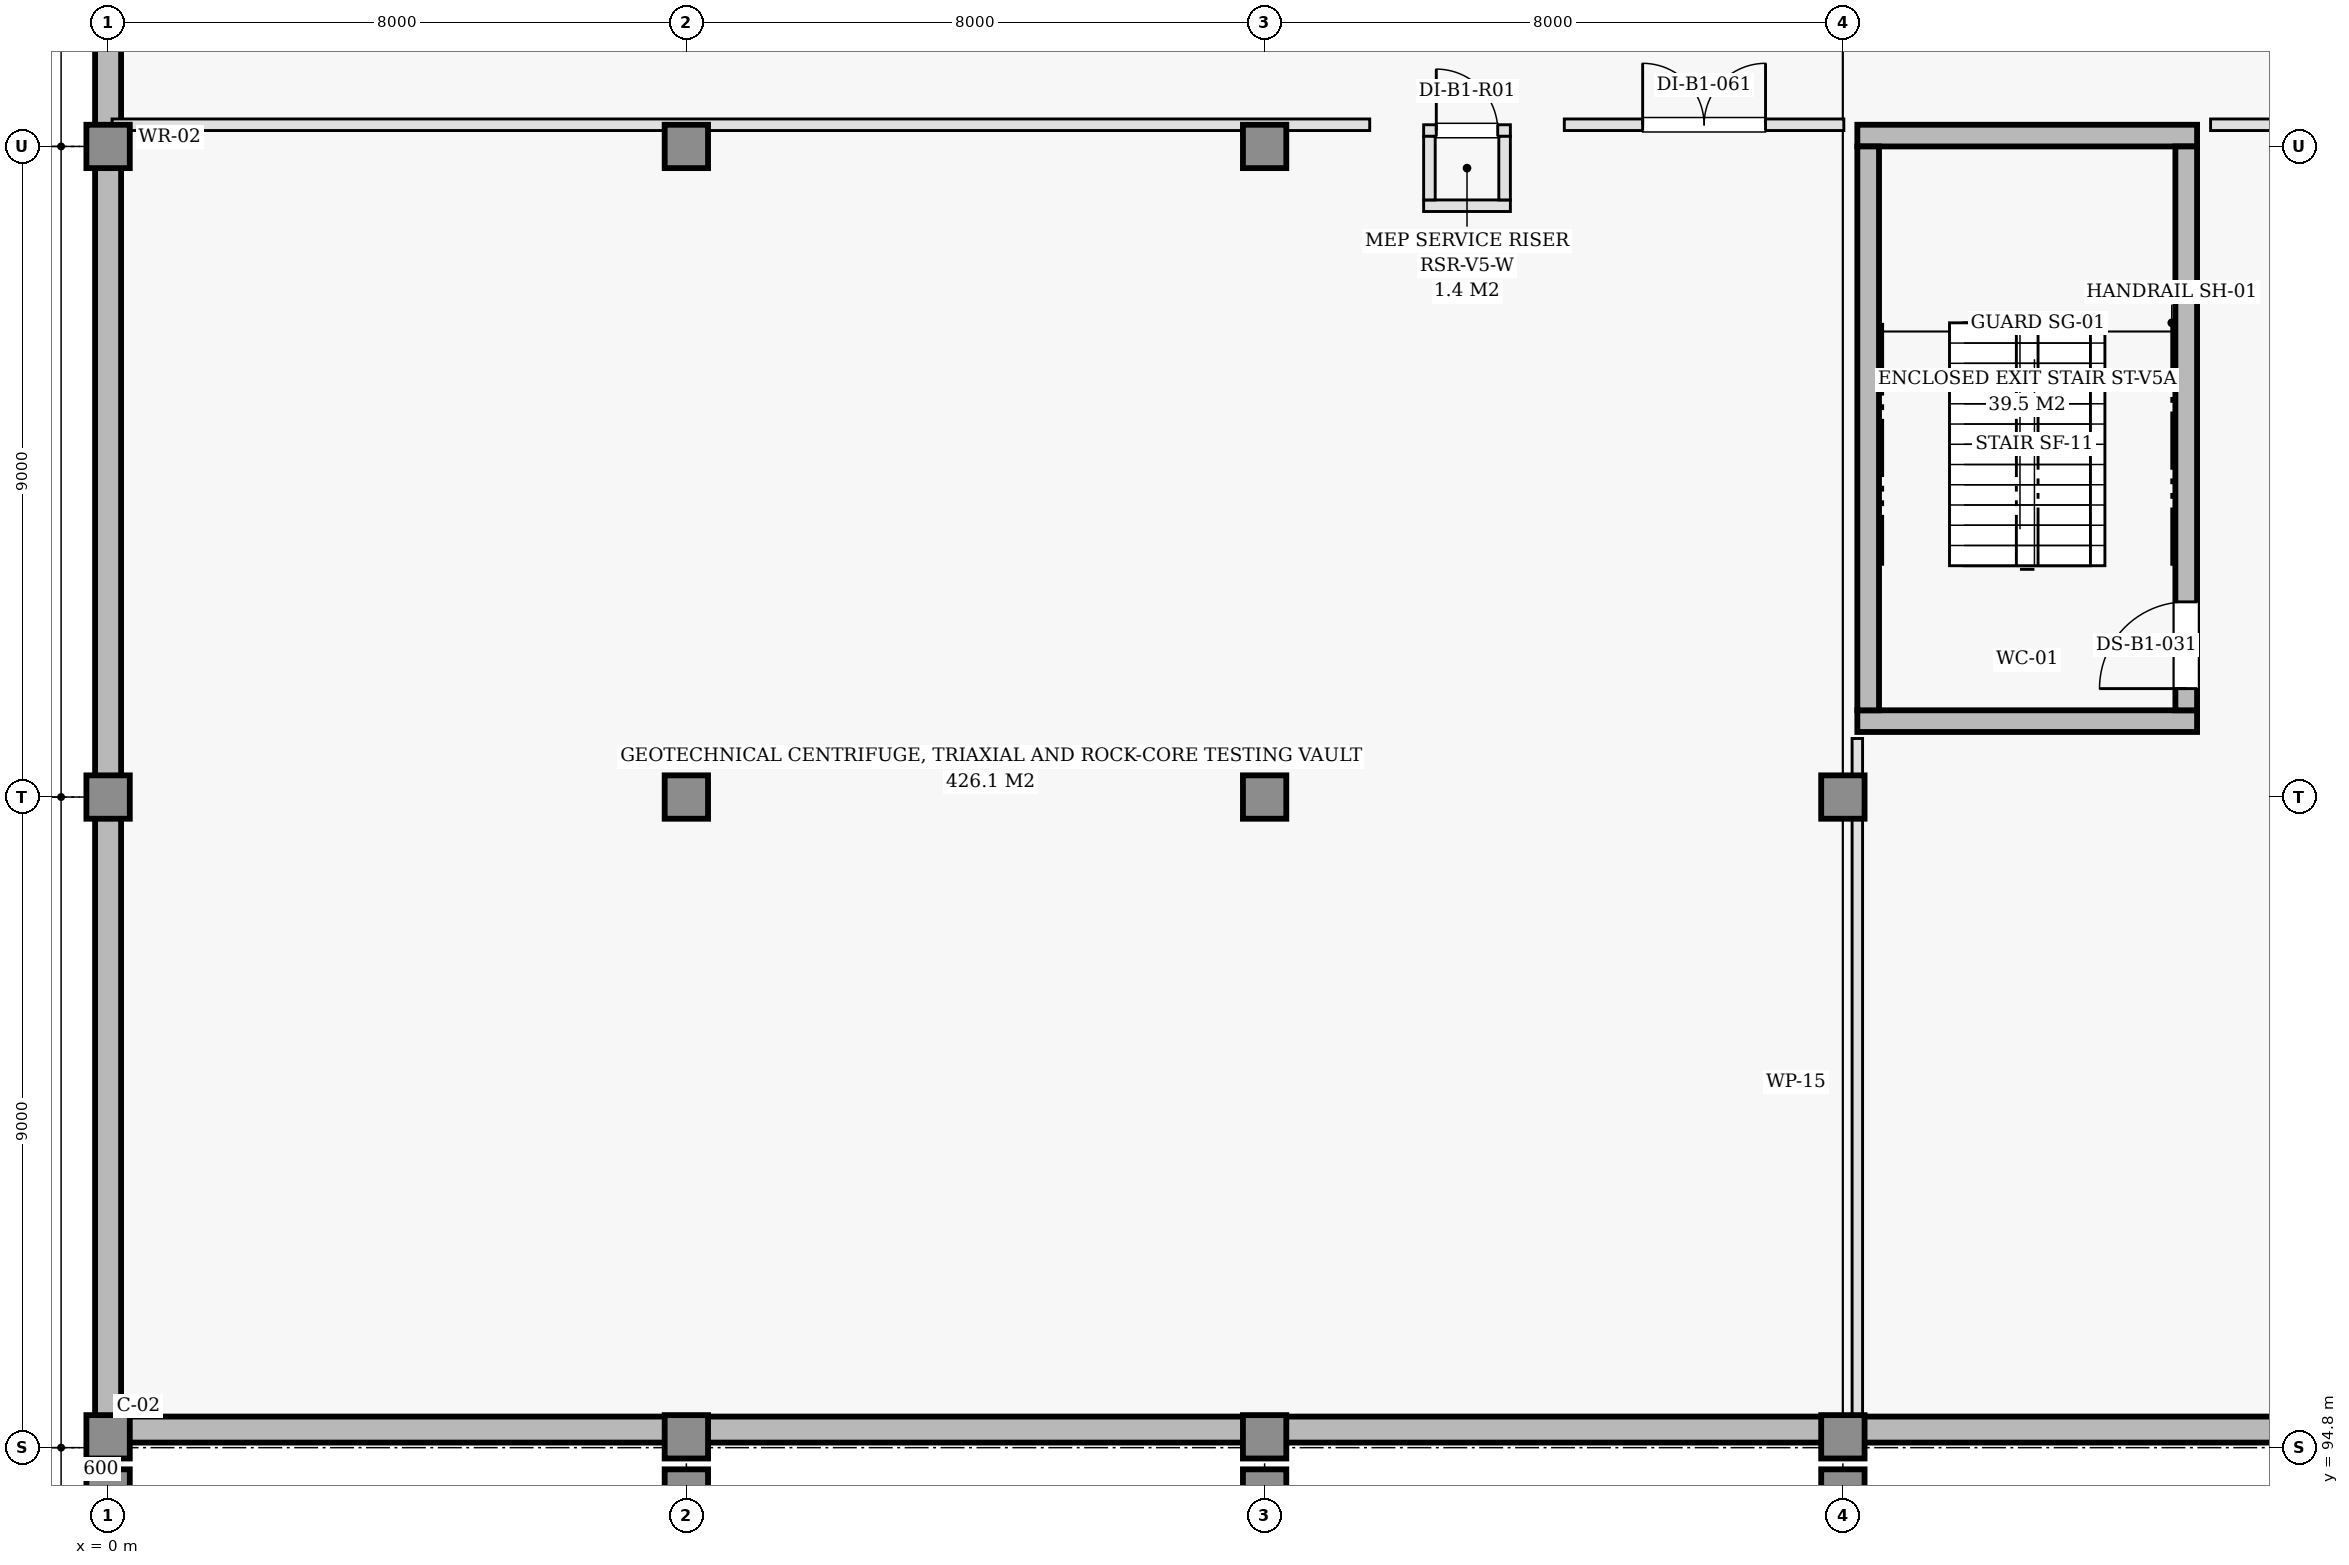
"""IFC4 building model, lengths in metres.
Left out: names, types, materials, properties, quantities, classifications, styles, units other than length and angle.
Written with IfcOpenShell. Run it as: python <this file> out.ifc"""

import sys

from ifc_helpers import new_model, si_unit, direction, frame, frame_2d, origin, origin_2d, place, context, subcontext, project, spatial, rectangle, extrude, element, fill, save


model = new_model("IFC4")
c1 = context("Model", 3, precision=1e-05, world=origin(), true_north=direction((0.0, 1.0)))
c2 = subcontext(c1, "Body", "Model", "MODEL_VIEW")
j1 = project(units=[si_unit("LENGTHUNIT", "METRE"), si_unit("PLANEANGLEUNIT", "RADIAN")], contexts=[c1])
p1 = place(None, origin())
s1 = spatial("IfcSite", under=j1, at=p1, CompositionType="ELEMENT")
p2 = place(p1, origin())
s2 = spatial("IfcBuilding", under=s1, at=p2, CompositionType="ELEMENT")
p3 = place(p2, frame((0.0, 0.0, -4.5)))
s3 = spatial("IfcBuildingStorey", under=s2, at=p3, CompositionType="ELEMENT", Elevation=-4.5)
for number, where, z_axis, x_axis in (
    (1, (0.0, 94.95, 0.0), (0.0, 0.0, 1.0), (1.0, 0.0, 0.0)),
    (2, (0.0, 103.8, 0.0), (0.0, 0.0, 1.0), (1.0, 0.0, 0.0)),
    (3, (0.0, 112.8, 0.0), (0.0, 0.0, 1.0), (1.0, 0.0, 0.0)),
    (4, (8.0, 94.95, 0.0), (0.0, 0.0, 1.0), (1.0, 0.0, 0.0)),
    (5, (8.0, 103.8, 0.0), (0.0, 0.0, 1.0), (1.0, 0.0, 0.0)),
    (6, (8.0, 112.8, 0.0), (0.0, 0.0, 1.0), (1.0, 0.0, 0.0)),
    (7, (16.0, 94.95, 0.0), (0.0, 0.0, 1.0), (1.0, 0.0, 0.0)),
    (8, (16.0, 103.8, 0.0), (0.0, 0.0, 1.0), (1.0, 0.0, 0.0)),
    (9, (16.0, 112.8, 0.0), (0.0, 0.0, 1.0), (1.0, 0.0, 0.0)),
    (10, (24.0, 94.95, 0.0), (0.0, 0.0, 1.0), (1.0, 0.0, 0.0)),
    (11, (24.0, 103.8, 0.0), (0.0, 0.0, 1.0), (1.0, 0.0, 0.0)),
):
    element("IfcColumn", number, at=place(p3, frame(where, z_axis=z_axis, x_axis=x_axis)), inside=s3, PredefinedType="COLUMN", context=c2, shape_type="SweptSolid", body=[
        extrude(rectangle(XDim=0.6, YDim=0.6, at=origin_2d()), origin(), (0.0, 0.0, 1.0), 4.5),
    ])
for number, where, z_axis, x_axis in (
    (12, (0.0, 94.2, 0.0), (0.0, 0.0, 1.0), (1.0, 0.0, 0.0)),
    (13, (8.0, 94.2, 0.0), (0.0, 0.0, 1.0), (1.0, 0.0, 0.0)),
    (14, (16.0, 94.2, 0.0), (0.0, 0.0, 1.0), (1.0, 0.0, 0.0)),
    (15, (24.0, 94.2, 0.0), (0.0, 0.0, 1.0), (1.0, 0.0, 0.0)),
):
    element("IfcColumn", number, at=place(p3, frame(where, z_axis=z_axis, x_axis=x_axis)), inside=s3, PredefinedType="PILASTER", context=c2, shape_type="SweptSolid", body=[
        extrude(rectangle(XDim=0.6, YDim=0.6, at=origin_2d()), origin(), (0.0, 0.0, 1.0), 4.5),
    ])
p4 = place(p3, frame((0.0, 95.05, 0.0), z_axis=(0.0, 0.0, 1.0), x_axis=(1.0, 0.0, 0.0)))
e16 = element("IfcWall", 16, at=p4, inside=s3, PredefinedType="USERDEFINED", context=c2, shape_type="SweptSolid", body=[
    extrude(rectangle(XDim=148.2, YDim=0.36, at=frame_2d((74.1, 0.0))), origin(), (0.0, 0.0, 1.0), 4.15),
])
p5 = place(p3, frame((0.0, 130.8, 0.0), z_axis=(0.0, 0.0, 1.0), x_axis=(0.0, -1.0, 0.0)))
e17 = element("IfcWall", 17, at=p5, inside=s3, PredefinedType="USERDEFINED", context=c2, shape_type="SweptSolid", body=[
    extrude(rectangle(XDim=35.75, YDim=0.36, at=frame_2d((17.875, 0.0))), origin(), (0.0, 0.0, 1.0), 4.15),
])
for number, where, z_axis, x_axis in (
    (18, (24.2, 104.85, 0.0), (0.0, 0.0, 1.0), (1.0, 0.0, 0.0)),
    (19, (24.2, 112.95, 0.0), (0.0, 0.0, 1.0), (1.0, 0.0, 0.0)),
):
    element("IfcWall", number, at=place(p3, frame(where, z_axis=z_axis, x_axis=x_axis)), inside=s3, PredefinedType="SHEAR", context=c2, shape_type="SweptSolid", body=[
        extrude(rectangle(XDim=4.7, YDim=0.3, at=frame_2d((2.35, 0.0))), origin(), (0.0, 0.0, 1.0), 4.15),
    ])
p6 = place(p3, frame((24.35, 105.0, 0.0), z_axis=(0.0, 0.0, 1.0), x_axis=(0.0, 1.0, 0.0)))
e20 = element("IfcWall", 20, at=p6, inside=s3, PredefinedType="SHEAR", context=c2, shape_type="SweptSolid", body=[
    extrude(rectangle(XDim=7.8, YDim=0.3, at=frame_2d((3.9, 0.0))), origin(), (0.0, 0.0, 1.0), 4.15),
])
p7 = place(p3, frame((28.75, 105.0, 0.0), z_axis=(0.0, 0.0, 1.0), x_axis=(0.0, 1.0, 0.0)))
e21 = element("IfcWall", 21, at=p7, inside=s3, PredefinedType="SHEAR", context=c2, shape_type="SweptSolid", body=[
    extrude(rectangle(XDim=7.8, YDim=0.3, at=frame_2d((3.9, 0.0))), origin(), (0.0, 0.0, 1.0), 4.15),
])
p8 = place(p7, frame((0.3, 0.0, 0.0)))
e22 = element("IfcOpeningElement", 22, at=p8, cuts=e21, PredefinedType="OPENING", context=c2, shape_type="SweptSolid", body=[
    extrude(rectangle(XDim=1.2, YDim=2.15, at=frame_2d((0.6, 1.075))), frame((0.0, 0.16, 0.0), z_axis=(0.0, -1.0, 0.0), x_axis=(1.0, 0.0, 0.0)), (0.0, 0.0, 1.0), 0.32),
])
p9 = place(p3, frame((18.2, 111.98, 0.0), z_axis=(0.0, 0.0, 1.0), x_axis=(1.0, 0.0, 0.0)))
e23 = element("IfcWall", 23, at=p9, inside=s3, PredefinedType="PARTITIONING", context=c2, shape_type="SweptSolid", body=[
    extrude(rectangle(XDim=1.2, YDim=0.16, at=frame_2d((0.6, 0.0))), origin(), (0.0, 0.0, 1.0), 4.15),
])
p10 = place(p3, frame((18.2, 113.02, 0.0), z_axis=(0.0, 0.0, 1.0), x_axis=(1.0, 0.0, 0.0)))
e24 = element("IfcWall", 24, at=p10, inside=s3, PredefinedType="PARTITIONING", context=c2, shape_type="SweptSolid", body=[
    extrude(rectangle(XDim=1.2, YDim=0.16, at=frame_2d((0.6, 0.0))), origin(), (0.0, 0.0, 1.0), 4.15),
])
p11 = place(p10, frame((0.175, 0.0, 0.0)))
e25 = element("IfcOpeningElement", 25, at=p11, cuts=e24, PredefinedType="OPENING", context=c2, shape_type="SweptSolid", body=[
    extrude(rectangle(XDim=0.85, YDim=2.02, at=frame_2d((0.425, 1.01))), frame((0.0, 0.09, 0.0), z_axis=(0.0, -1.0, 0.0), x_axis=(1.0, 0.0, 0.0)), (0.0, 0.0, 1.0), 0.18),
])
for number, where, z_axis, x_axis in (
    (26, (18.28, 112.06, 0.0), (0.0, 0.0, 1.0), (0.0, 1.0, 0.0)),
    (27, (19.32, 112.06, 0.0), (0.0, 0.0, 1.0), (0.0, 1.0, 0.0)),
):
    element("IfcWall", number, at=place(p3, frame(where, z_axis=z_axis, x_axis=x_axis)), inside=s3, PredefinedType="PARTITIONING", context=c2, shape_type="SweptSolid", body=[
        extrude(rectangle(XDim=0.88, YDim=0.16, at=frame_2d((0.44, 0.0))), origin(), (0.0, 0.0, 1.0), 4.15),
    ])
p12 = place(p3, frame((20.146, 113.1, 0.0), z_axis=(0.0, 0.0, 1.0), x_axis=(1.0, 0.0, 0.0)))
e28 = element("IfcWall", 28, at=p12, inside=s3, PredefinedType="PARTITIONING", context=c2, shape_type="SweptSolid", body=[
    extrude(rectangle(XDim=3.867, YDim=0.16, at=frame_2d((1.934, 0.0))), origin(), (0.0, 0.0, 1.0), 4.15),
])
p13 = place(p12, frame((1.084, 0.0, 0.0)))
e29 = element("IfcOpeningElement", 29, at=p13, cuts=e28, PredefinedType="OPENING", context=c2, shape_type="SweptSolid", body=[
    extrude(rectangle(XDim=1.7, YDim=2.2, at=frame_2d((0.85, 1.1))), frame((0.0, 0.09, 0.0), z_axis=(0.0, -1.0, 0.0), x_axis=(1.0, 0.0, 0.0)), (0.0, 0.0, 1.0), 0.18),
])
p14 = place(p3, frame((0.055, 113.1, 0.0), z_axis=(0.0, 0.0, 1.0), x_axis=(1.0, 0.0, 0.0)))
e30 = element("IfcWall", 30, at=p14, inside=s3, PredefinedType="PARTITIONING", context=c2, shape_type="SweptSolid", body=[
    extrude(rectangle(XDim=17.399, YDim=0.16, at=frame_2d((8.7, 0.0))), origin(), (0.0, 0.0, 1.0), 3.385),
])
p15 = place(p3, frame((24.2, 95.105, 0.0), z_axis=(0.0, 0.0, 1.0), x_axis=(0.0, 1.0, 0.0)))
e31 = element("IfcWall", 31, at=p15, inside=s3, PredefinedType="PARTITIONING", context=c2, shape_type="SweptSolid", body=[
    extrude(rectangle(XDim=9.505, YDim=0.145, at=frame_2d((4.752, 0.0))), origin(), (0.0, 0.0, 1.0), 3.385),
])
p16 = place(p3, frame((29.087, 113.1, 0.0), z_axis=(0.0, 0.0, 1.0), x_axis=(1.0, 0.0, 0.0)))
e32 = element("IfcWall", 32, at=p16, inside=s3, PredefinedType="PARTITIONING", context=c2, shape_type="SweptSolid", body=[
    extrude(rectangle(XDim=2.873, YDim=0.16, at=frame_2d((1.437, 0.0))), origin(), (0.0, 0.0, 1.0), 3.485),
])
p17 = place(p8, origin())
e33 = element("IfcDoor", 33, at=p17, inside=s3, OperationType="SINGLE_SWING_LEFT", PredefinedType="DOOR", context=c2, shape_type="SweptSolid", body=[
    extrude(rectangle(XDim=1.2, YDim=2.15, at=frame_2d((0.6, 1.075))), frame((0.0, 0.025, 0.0), z_axis=(0.0, -1.0, 0.0), x_axis=(1.0, 0.0, 0.0)), (0.0, 0.0, 1.0), 0.05),
])
fill(e22, e33)
p18 = place(p11, origin())
e34 = element("IfcDoor", 34, at=p18, inside=s3, OperationType="SINGLE_SWING_LEFT", PredefinedType="DOOR", context=c2, shape_type="SweptSolid", body=[
    extrude(rectangle(XDim=0.85, YDim=2.02, at=frame_2d((0.425, 1.01))), frame((0.0, 0.025, 0.0), z_axis=(0.0, -1.0, 0.0), x_axis=(1.0, 0.0, 0.0)), (0.0, 0.0, 1.0), 0.05),
])
fill(e25, e34)
p19 = place(p13, origin())
e35 = element("IfcDoor", 35, at=p19, inside=s3, OperationType="DOUBLE_DOOR_SINGLE_SWING", PredefinedType="DOOR", context=c2, shape_type="SweptSolid", body=[
    extrude(rectangle(XDim=1.7, YDim=2.2, at=frame_2d((0.85, 1.1))), frame((0.0, 0.025, 0.0), z_axis=(0.0, -1.0, 0.0), x_axis=(1.0, 0.0, 0.0)), (0.0, 0.0, 1.0), 0.05),
])
fill(e29, e35)
save(model, sys.argv[1])
